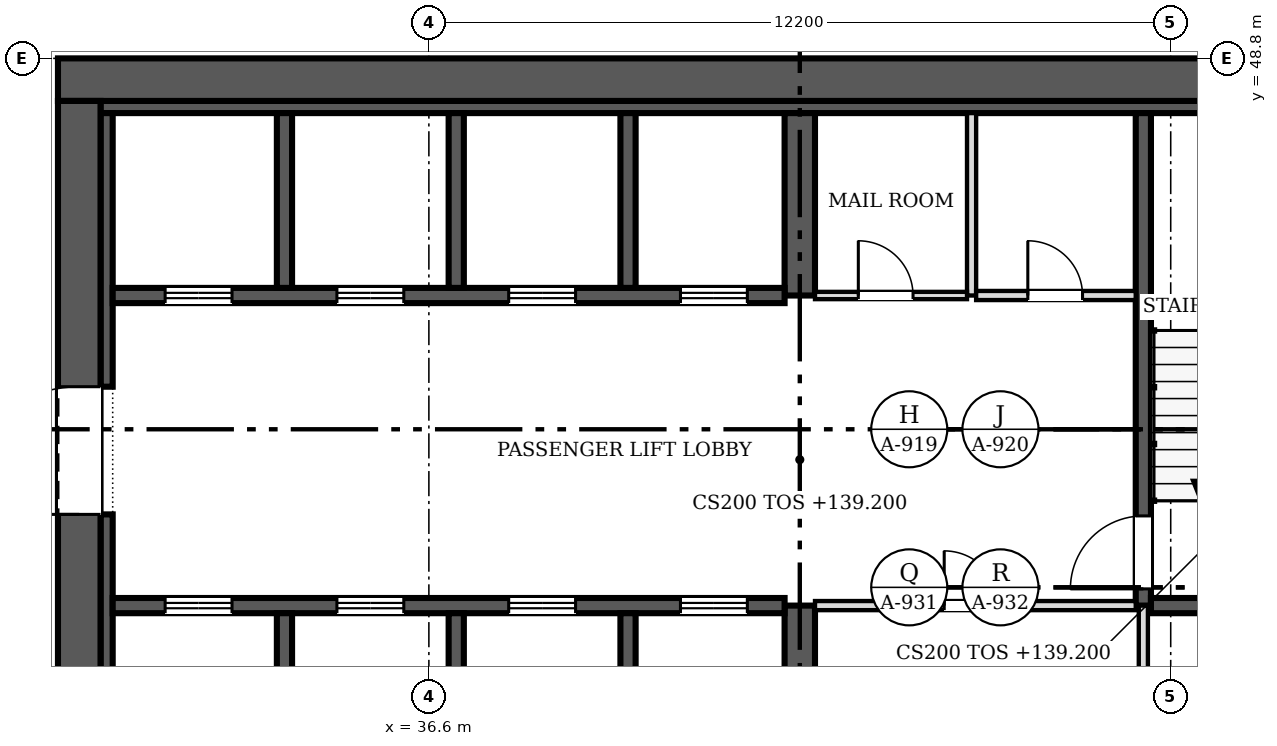
"""IFC4 building model, lengths in metres.
Left out: names, types, materials, properties, quantities, classifications, styles, units other than length and angle.
Written with IfcOpenShell. Run it as: python <this file> out.ifc"""

import sys

from ifc_helpers import new_model, si_unit, direction, frame, frame_2d, origin, place, context, subcontext, project, spatial, rectangle, extrude, source, transform, mapped, element, fill, save


model = new_model("IFC4")
c1 = context("Model", 3, precision=1e-05, world=origin(), true_north=direction((0.0, 1.0)))
c2 = subcontext(c1, "Body", "Model", "MODEL_VIEW")
j1 = project(units=[si_unit("LENGTHUNIT", "METRE"), si_unit("PLANEANGLEUNIT", "RADIAN")], contexts=[c1])
p1 = place(None, origin())
s1 = spatial("IfcSite", under=j1, at=p1, CompositionType="ELEMENT")
p2 = place(p1, origin())
s2 = spatial("IfcBuilding", under=s1, at=p2, CompositionType="ELEMENT")
p3 = place(p2, frame((0.0, 0.0, 139.2)))
s3 = spatial("IfcBuildingStorey", under=s2, at=p3, CompositionType="ELEMENT", Elevation=139.2)
p4 = place(p3, frame((30.85, 25.1, 0.0), z_axis=(0.0, 0.0, 1.0), x_axis=(0.0, 1.0, 0.0)))
e1 = element("IfcWall", 1, at=p4, inside=s3, PredefinedType="SHEAR", context=c2, shape_type="SweptSolid", body=[
    extrude(rectangle(XDim=23.0, YDim=0.7, at=frame_2d((11.5, 0.0))), origin(), (0.0, 0.0, 1.0), 3.8),
])
m1 = source(origin(), c2, "Body", "SweptSolid", [
    extrude(rectangle(XDim=2.1, YDim=2.4, at=frame_2d((1.05, 1.2))), frame((0.0, 0.36, 0.0), z_axis=(0.0, -1.0, 0.0), x_axis=(1.0, 0.0, 0.0)), (0.0, 0.0, 1.0), 0.72),
])
p5 = place(p4, frame((4.7, 0.0, 0.0)))
e2 = element("IfcOpeningElement", 2, at=p5, cuts=e1, PredefinedType="OPENING", context=c2, shape_type="MappedRepresentation", body=[
    mapped(m1, transform((0.0, 0.0, 0.0), scale=1.0)),
])
p6 = place(p4, frame((16.2, 0.0, 0.0)))
e3 = element("IfcOpeningElement", 3, at=p6, cuts=e1, PredefinedType="OPENING", context=c2, shape_type="MappedRepresentation", body=[
    mapped(m1, transform((0.0, 0.0, 0.0), scale=1.0)),
])
p7 = place(p3, frame((30.5, 48.45, 0.0), z_axis=(0.0, 0.0, 1.0), x_axis=(1.0, 0.0, 0.0)))
e4 = element("IfcWall", 4, at=p7, inside=s3, PredefinedType="SHEAR", context=c2, shape_type="SweptSolid", body=[
    extrude(rectangle(XDim=24.4, YDim=0.7, at=frame_2d((12.2, 0.0))), origin(), (0.0, 0.0, 1.0), 3.8),
])
p8 = place(p3, frame((31.2, 48.0, 0.0), z_axis=(0.0, 0.0, 1.0), x_axis=(1.0, 0.0, 0.0)))
e5 = element("IfcWall", 5, at=p8, inside=s3, PredefinedType="SOLIDWALL", context=c2, shape_type="SweptSolid", body=[
    extrude(rectangle(XDim=23.0, YDim=0.2, at=frame_2d((11.5, 0.0))), origin(), (0.0, 0.0, 1.0), 3.8),
])
p9 = place(p3, frame((31.3, 31.9, 0.0), z_axis=(0.0, 0.0, 1.0), x_axis=(0.0, 1.0, 0.0)))
e6 = element("IfcWall", 6, at=p9, inside=s3, PredefinedType="SOLIDWALL", context=c2, shape_type="SweptSolid", body=[
    extrude(rectangle(XDim=9.4, YDim=0.2, at=frame_2d((4.7, 0.0))), origin(), (0.0, 0.0, 1.0), 3.8),
])
p10 = place(p3, frame((31.3, 43.4, 0.0), z_axis=(0.0, 0.0, 1.0), x_axis=(0.0, 1.0, 0.0)))
e7 = element("IfcWall", 7, at=p10, inside=s3, PredefinedType="SOLIDWALL", context=c2, shape_type="SweptSolid", body=[
    extrude(rectangle(XDim=4.5, YDim=0.2, at=frame_2d((2.25, 0.0))), origin(), (0.0, 0.0, 1.0), 3.8),
])
p11 = place(p3, frame((42.7, 36.85, 0.0), z_axis=(0.0, 0.0, 1.0), x_axis=(0.0, 1.0, 0.0)))
e8 = element("IfcWall", 8, at=p11, inside=s3, PredefinedType="SHEAR", context=c2, shape_type="SweptSolid", body=[
    extrude(rectangle(XDim=2.95, YDim=0.5, at=frame_2d((1.475, 0.0))), origin(), (0.0, 0.0, 1.0), 3.8),
])
p12 = place(p3, frame((42.7, 44.9, 0.0), z_axis=(0.0, 0.0, 1.0), x_axis=(0.0, 1.0, 0.0)))
e9 = element("IfcWall", 9, at=p12, inside=s3, PredefinedType="SHEAR", context=c2, shape_type="SweptSolid", body=[
    extrude(rectangle(XDim=3.0, YDim=0.5, at=frame_2d((1.5, 0.0))), origin(), (0.0, 0.0, 1.0), 3.8),
])
p13 = place(p3, frame((31.4, 39.8, 0.0), z_axis=(0.0, 0.0, 1.0), x_axis=(1.0, 0.0, 0.0)))
e10 = element("IfcWall", 10, at=p13, inside=s3, PredefinedType="SOLIDWALL", context=c2, shape_type="SweptSolid", body=[
    extrude(rectangle(XDim=11.05, YDim=0.25, at=frame_2d((5.525, 0.0))), origin(), (0.0, 0.0, 1.0), 3.8),
])
m2 = source(origin(), c2, "Body", "SweptSolid", [
    extrude(rectangle(XDim=1.1, YDim=2.1, at=frame_2d((0.55, 1.05))), frame((0.0, 0.135, 0.0), z_axis=(0.0, -1.0, 0.0), x_axis=(1.0, 0.0, 0.0)), (0.0, 0.0, 1.0), 0.27),
])
p14 = place(p13, frame((0.863, 0.0, 0.0)))
e11 = element("IfcOpeningElement", 11, at=p14, cuts=e10, PredefinedType="OPENING", context=c2, shape_type="MappedRepresentation", body=[
    mapped(m2, transform((0.0, 0.0, 0.0), scale=1.0)),
])
p15 = place(p13, frame((3.688, 0.0, 0.0)))
e12 = element("IfcOpeningElement", 12, at=p15, cuts=e10, PredefinedType="OPENING", context=c2, shape_type="MappedRepresentation", body=[
    mapped(m2, transform((0.0, 0.0, 0.0), scale=1.0)),
])
p16 = place(p13, frame((6.512, 0.0, 0.0)))
e13 = element("IfcOpeningElement", 13, at=p16, cuts=e10, PredefinedType="OPENING", context=c2, shape_type="MappedRepresentation", body=[
    mapped(m2, transform((0.0, 0.0, 0.0), scale=1.0)),
])
p17 = place(p13, frame((9.337, 0.0, 0.0)))
e14 = element("IfcOpeningElement", 14, at=p17, cuts=e10, PredefinedType="OPENING", context=c2, shape_type="MappedRepresentation", body=[
    mapped(m2, transform((0.0, 0.0, 0.0), scale=1.0)),
])
p18 = place(p3, frame((42.45, 44.9, 0.0), z_axis=(0.0, 0.0, 1.0), x_axis=(-1.0, 0.0, 0.0)))
e15 = element("IfcWall", 15, at=p18, inside=s3, PredefinedType="SOLIDWALL", context=c2, shape_type="SweptSolid", body=[
    extrude(rectangle(XDim=11.05, YDim=0.25, at=frame_2d((5.525, 0.0))), origin(), (0.0, 0.0, 1.0), 3.8),
])
p19 = place(p18, frame((9.087, 0.0, 0.0)))
e16 = element("IfcOpeningElement", 16, at=p19, cuts=e15, PredefinedType="OPENING", context=c2, shape_type="MappedRepresentation", body=[
    mapped(m2, transform((0.0, 0.0, 0.0), scale=1.0)),
])
p20 = place(p18, frame((6.262, 0.0, 0.0)))
e17 = element("IfcOpeningElement", 17, at=p20, cuts=e15, PredefinedType="OPENING", context=c2, shape_type="MappedRepresentation", body=[
    mapped(m2, transform((0.0, 0.0, 0.0), scale=1.0)),
])
p21 = place(p18, frame((3.438, 0.0, 0.0)))
e18 = element("IfcOpeningElement", 18, at=p21, cuts=e15, PredefinedType="OPENING", context=c2, shape_type="MappedRepresentation", body=[
    mapped(m2, transform((0.0, 0.0, 0.0), scale=1.0)),
])
p22 = place(p18, frame((0.613, 0.0, 0.0)))
e19 = element("IfcOpeningElement", 19, at=p22, cuts=e15, PredefinedType="OPENING", context=c2, shape_type="MappedRepresentation", body=[
    mapped(m2, transform((0.0, 0.0, 0.0), scale=1.0)),
])
p23 = place(p3, frame((48.35, 47.9, 0.0), z_axis=(0.0, 0.0, 1.0), x_axis=(0.0, -1.0, 0.0)))
e20 = element("IfcWall", 20, at=p23, inside=s3, PredefinedType="SOLIDWALL", context=c2, shape_type="SweptSolid", body=[
    extrude(rectangle(XDim=8.1, YDim=0.25, at=frame_2d((4.05, 0.0))), origin(), (0.0, 0.0, 1.0), 3.8),
])
m3 = source(origin(), c2, "Body", "SweptSolid", [
    extrude(rectangle(XDim=1.2, YDim=2.1, at=frame_2d((0.6, 1.05))), frame((0.0, 0.135, 0.0), z_axis=(0.0, -1.0, 0.0), x_axis=(1.0, 0.0, 0.0)), (0.0, 0.0, 1.0), 0.27),
])
p24 = place(p23, frame((6.625, 0.0, 0.0)))
e21 = element("IfcOpeningElement", 21, at=p24, cuts=e20, PredefinedType="OPENING", context=c2, shape_type="MappedRepresentation", body=[
    mapped(m3, transform((0.0, 0.0, 0.0), scale=1.0)),
])
p25 = place(p3, frame((48.475, 39.8, 0.0), z_axis=(0.0, 0.0, 1.0), x_axis=(1.0, 0.0, 0.0)))
e22 = element("IfcWall", 22, at=p25, inside=s3, PredefinedType="SOLIDWALL", context=c2, shape_type="SweptSolid", body=[
    extrude(rectangle(XDim=3.4, YDim=0.25, at=frame_2d((1.7, 0.0))), origin(), (0.0, 0.0, 1.0), 3.8),
])
for number, where, z_axis, x_axis in (
    (23, (34.225, 36.85, 0.0), (0.0, 0.0, 1.0), (0.0, 1.0, 0.0)),
    (24, (37.05, 36.85, 0.0), (0.0, 0.0, 1.0), (0.0, 1.0, 0.0)),
    (25, (39.875, 36.85, 0.0), (0.0, 0.0, 1.0), (0.0, 1.0, 0.0)),
):
    element("IfcWall", number, at=place(p3, frame(where, z_axis=z_axis, x_axis=x_axis)), inside=s3, PredefinedType="SOLIDWALL", context=c2, shape_type="SweptSolid", body=[
        extrude(rectangle(XDim=2.825, YDim=0.25, at=frame_2d((1.413, 0.0))), origin(), (0.0, 0.0, 1.0), 3.8),
    ])
for number, where, z_axis, x_axis in (
    (26, (34.225, 45.025, 0.0), (0.0, 0.0, 1.0), (0.0, 1.0, 0.0)),
    (27, (37.05, 45.025, 0.0), (0.0, 0.0, 1.0), (0.0, 1.0, 0.0)),
    (28, (39.875, 45.025, 0.0), (0.0, 0.0, 1.0), (0.0, 1.0, 0.0)),
):
    element("IfcWall", number, at=place(p3, frame(where, z_axis=z_axis, x_axis=x_axis)), inside=s3, PredefinedType="SOLIDWALL", context=c2, shape_type="SweptSolid", body=[
        extrude(rectangle(XDim=2.875, YDim=0.25, at=frame_2d((1.438, 0.0))), origin(), (0.0, 0.0, 1.0), 3.8),
    ])
p26 = place(p3, frame((48.225, 39.8, 0.0), z_axis=(0.0, 0.0, 1.0), x_axis=(-1.0, 0.0, 0.0)))
e29 = element("IfcWall", 29, at=p26, inside=s3, PredefinedType="PARTITIONING", context=c2, shape_type="SweptSolid", body=[
    extrude(rectangle(XDim=5.275, YDim=0.15, at=frame_2d((2.638, 0.0))), origin(), (0.0, 0.0, 1.0), 3.6),
])
m4 = source(origin(), c2, "Body", "SweptSolid", [
    extrude(rectangle(XDim=0.9, YDim=2.1, at=frame_2d((0.45, 1.05))), frame((0.0, 0.085, 0.0), z_axis=(0.0, -1.0, 0.0), x_axis=(1.0, 0.0, 0.0)), (0.0, 0.0, 1.0), 0.17),
])
p27 = place(p26, frame((2.25, 0.0, 0.0)))
e30 = element("IfcOpeningElement", 30, at=p27, cuts=e29, PredefinedType="OPENING", context=c2, shape_type="MappedRepresentation", body=[
    mapped(m4, transform((0.0, 0.0, 0.0), scale=1.0)),
])
p28 = place(p3, frame((48.35, 36.85, 0.0), z_axis=(0.0, 0.0, 1.0), x_axis=(0.0, 1.0, 0.0)))
e31 = element("IfcWall", 31, at=p28, inside=s3, PredefinedType="PARTITIONING", context=c2, shape_type="SweptSolid", body=[
    extrude(rectangle(XDim=2.95, YDim=0.15, at=frame_2d((1.475, 0.0))), origin(), (0.0, 0.0, 1.0), 3.6),
])
p29 = place(p3, frame((45.525, 44.9, 0.0), z_axis=(0.0, 0.0, 1.0), x_axis=(0.0, 1.0, 0.0)))
e32 = element("IfcWall", 32, at=p29, inside=s3, PredefinedType="PARTITIONING", context=c2, shape_type="SweptSolid", body=[
    extrude(rectangle(XDim=3.0, YDim=0.15, at=frame_2d((1.5, 0.0))), origin(), (0.0, 0.0, 1.0), 3.6),
])
p30 = place(p3, frame((42.95, 44.9, 0.0), z_axis=(0.0, 0.0, 1.0), x_axis=(1.0, 0.0, 0.0)))
e33 = element("IfcWall", 33, at=p30, inside=s3, PredefinedType="PARTITIONING", context=c2, shape_type="SweptSolid", body=[
    extrude(rectangle(XDim=2.5, YDim=0.12, at=frame_2d((1.25, 0.0))), origin(), (0.0, 0.0, 1.0), 3.6),
])
m5 = source(origin(), c2, "Body", "SweptSolid", [
    extrude(rectangle(XDim=0.9, YDim=2.1, at=frame_2d((0.45, 1.05))), frame((0.0, 0.07, 0.0), z_axis=(0.0, -1.0, 0.0), x_axis=(1.0, 0.0, 0.0)), (0.0, 0.0, 1.0), 0.14),
])
p31 = place(p30, frame((0.712, 0.0, 0.0)))
e34 = element("IfcOpeningElement", 34, at=p31, cuts=e33, PredefinedType="OPENING", context=c2, shape_type="MappedRepresentation", body=[
    mapped(m5, transform((0.0, 0.0, 0.0), scale=1.0)),
])
p32 = place(p3, frame((45.6, 44.9, 0.0), z_axis=(0.0, 0.0, 1.0), x_axis=(1.0, 0.0, 0.0)))
e35 = element("IfcWall", 35, at=p32, inside=s3, PredefinedType="PARTITIONING", context=c2, shape_type="SweptSolid", body=[
    extrude(rectangle(XDim=2.625, YDim=0.15, at=frame_2d((1.312, 0.0))), origin(), (0.0, 0.0, 1.0), 3.6),
])
p33 = place(p32, frame((0.85, 0.0, 0.0)))
e36 = element("IfcOpeningElement", 36, at=p33, cuts=e35, PredefinedType="OPENING", context=c2, shape_type="MappedRepresentation", body=[
    mapped(m4, transform((0.0, 0.0, 0.0), scale=1.0)),
])
m6 = source(origin(), c2, "Body", "SweptSolid", [
    extrude(rectangle(XDim=2.1, YDim=2.4, at=frame_2d((1.05, 1.2))), frame((0.0, 0.025, 0.0), z_axis=(0.0, -1.0, 0.0), x_axis=(1.0, 0.0, 0.0)), (0.0, 0.0, 1.0), 0.05),
])
p34 = place(p6, origin())
e37 = element("IfcDoor", 37, at=p34, inside=s3, OperationType="DOUBLE_DOOR_SINGLE_SWING", PredefinedType="DOOR", context=c2, shape_type="MappedRepresentation", body=[
    mapped(m6, transform((0.0, 0.0, 0.0), scale=1.0)),
])
fill(e3, e37)
m7 = source(origin(), c2, "Body", "SweptSolid", [
    extrude(rectangle(XDim=1.1, YDim=2.1, at=frame_2d((0.55, 1.05))), frame((0.0, 0.025, 0.0), z_axis=(0.0, -1.0, 0.0), x_axis=(1.0, 0.0, 0.0)), (0.0, 0.0, 1.0), 0.05),
])
p35 = place(p14, origin())
e38 = element("IfcDoor", 38, at=p35, inside=s3, OperationType="DOUBLE_DOOR_SLIDING", PredefinedType="DOOR", context=c2, shape_type="MappedRepresentation", body=[
    mapped(m7, transform((0.0, 0.0, 0.0), scale=1.0)),
])
fill(e11, e38)
p36 = place(p15, origin())
e39 = element("IfcDoor", 39, at=p36, inside=s3, OperationType="DOUBLE_DOOR_SLIDING", PredefinedType="DOOR", context=c2, shape_type="MappedRepresentation", body=[
    mapped(m7, transform((0.0, 0.0, 0.0), scale=1.0)),
])
fill(e12, e39)
p37 = place(p16, origin())
e40 = element("IfcDoor", 40, at=p37, inside=s3, OperationType="DOUBLE_DOOR_SLIDING", PredefinedType="DOOR", context=c2, shape_type="MappedRepresentation", body=[
    mapped(m7, transform((0.0, 0.0, 0.0), scale=1.0)),
])
fill(e13, e40)
p38 = place(p17, origin())
e41 = element("IfcDoor", 41, at=p38, inside=s3, OperationType="DOUBLE_DOOR_SLIDING", PredefinedType="DOOR", context=c2, shape_type="MappedRepresentation", body=[
    mapped(m7, transform((0.0, 0.0, 0.0), scale=1.0)),
])
fill(e14, e41)
p39 = place(p19, origin())
e42 = element("IfcDoor", 42, at=p39, inside=s3, OperationType="DOUBLE_DOOR_SLIDING", PredefinedType="DOOR", context=c2, shape_type="MappedRepresentation", body=[
    mapped(m7, transform((0.0, 0.0, 0.0), scale=1.0)),
])
fill(e16, e42)
p40 = place(p20, origin())
e43 = element("IfcDoor", 43, at=p40, inside=s3, OperationType="DOUBLE_DOOR_SLIDING", PredefinedType="DOOR", context=c2, shape_type="MappedRepresentation", body=[
    mapped(m7, transform((0.0, 0.0, 0.0), scale=1.0)),
])
fill(e17, e43)
p41 = place(p21, origin())
e44 = element("IfcDoor", 44, at=p41, inside=s3, OperationType="DOUBLE_DOOR_SLIDING", PredefinedType="DOOR", context=c2, shape_type="MappedRepresentation", body=[
    mapped(m7, transform((0.0, 0.0, 0.0), scale=1.0)),
])
fill(e18, e44)
p42 = place(p22, origin())
e45 = element("IfcDoor", 45, at=p42, inside=s3, OperationType="DOUBLE_DOOR_SLIDING", PredefinedType="DOOR", context=c2, shape_type="MappedRepresentation", body=[
    mapped(m7, transform((0.0, 0.0, 0.0), scale=1.0)),
])
fill(e19, e45)
m8 = source(origin(), c2, "Body", "SweptSolid", [
    extrude(rectangle(XDim=1.2, YDim=2.1, at=frame_2d((0.6, 1.05))), frame((0.0, 0.025, 0.0), z_axis=(0.0, -1.0, 0.0), x_axis=(1.0, 0.0, 0.0)), (0.0, 0.0, 1.0), 0.05),
])
p43 = place(p24, origin())
e46 = element("IfcDoor", 46, at=p43, inside=s3, OperationType="SINGLE_SWING_RIGHT", PredefinedType="DOOR", context=c2, shape_type="MappedRepresentation", body=[
    mapped(m8, transform((0.0, 0.0, 0.0), scale=1.0)),
])
fill(e21, e46)
m9 = source(origin(), c2, "Body", "SweptSolid", [
    extrude(rectangle(XDim=0.9, YDim=2.1, at=frame_2d((0.45, 1.05))), frame((0.0, 0.025, 0.0), z_axis=(0.0, -1.0, 0.0), x_axis=(1.0, 0.0, 0.0)), (0.0, 0.0, 1.0), 0.05),
])
p44 = place(p27, origin())
e47 = element("IfcDoor", 47, at=p44, inside=s3, OperationType="SINGLE_SWING_RIGHT", PredefinedType="DOOR", context=c2, shape_type="MappedRepresentation", body=[
    mapped(m9, transform((0.0, 0.0, 0.0), scale=1.0)),
])
fill(e30, e47)
p45 = place(p31, origin())
e48 = element("IfcDoor", 48, at=p45, inside=s3, OperationType="SINGLE_SWING_LEFT", PredefinedType="DOOR", context=c2, shape_type="MappedRepresentation", body=[
    mapped(m9, transform((0.0, 0.0, 0.0), scale=1.0)),
])
fill(e34, e48)
p46 = place(p33, origin())
e49 = element("IfcDoor", 49, at=p46, inside=s3, OperationType="SINGLE_SWING_LEFT", PredefinedType="DOOR", context=c2, shape_type="MappedRepresentation", body=[
    mapped(m9, transform((0.0, 0.0, 0.0), scale=1.0)),
])
fill(e36, e49)
save(model, sys.argv[1])
